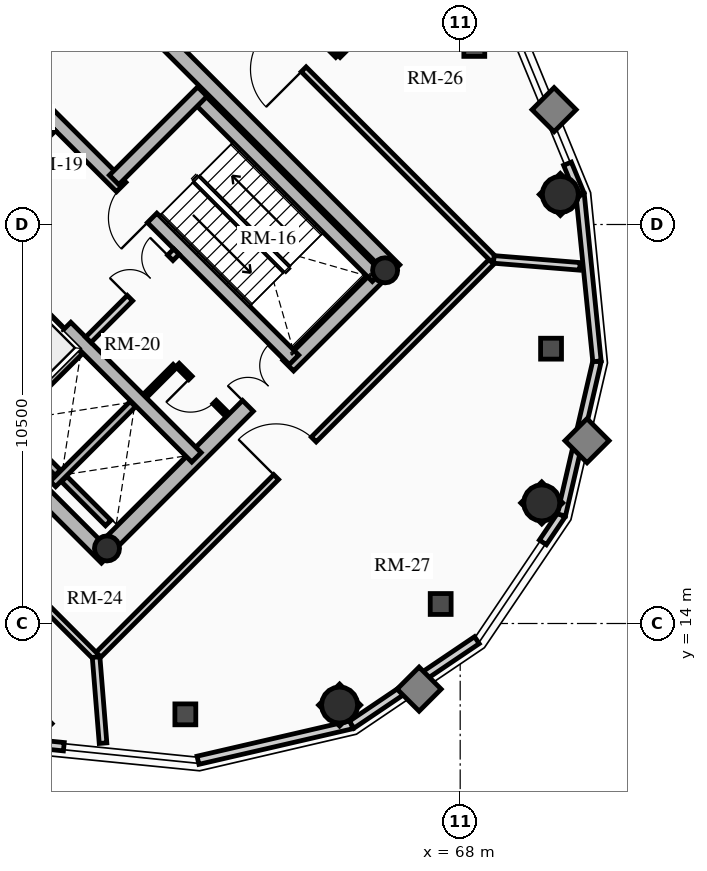
"""IFC4 building model, lengths in metres.
Left out: names, types, materials, properties, quantities, classifications, styles, units other than length and angle.
Written with IfcOpenShell. Run it as: python <this file> out.ifc"""

import sys

from ifc_helpers import new_model, si_unit, direction, frame, frame_2d, origin, origin_2d, place, context, subcontext, project, spatial, rectangle, circle, hollow_circle, extrude, source, transform, mapped, element, fill, save


model = new_model("IFC4")
c1 = context("Model", 3, precision=1e-05, world=origin(), true_north=direction((0.0, 1.0)))
c2 = subcontext(c1, "Body", "Model", "MODEL_VIEW")
j1 = project(units=[si_unit("LENGTHUNIT", "METRE"), si_unit("PLANEANGLEUNIT", "RADIAN")], contexts=[c1])
p1 = place(None, origin())
s1 = spatial("IfcSite", under=j1, at=p1, CompositionType="ELEMENT")
p2 = place(p1, origin())
s2 = spatial("IfcBuilding", under=s1, at=p2, CompositionType="ELEMENT")
p3 = place(p2, frame((0.0, 0.0, 235.65)))
s3 = spatial("IfcBuildingStorey", under=s2, at=p3, CompositionType="ELEMENT", Elevation=235.65)
for number, where, z_axis, x_axis in (
    (1, (58.702, 15.732, 0.0), (0.0, 0.0, 1.0), (-0.707, 0.707, 0.0)),
    (2, (66.268, 23.298, 0.0), (0.0, 0.0, 1.0), (-0.707, 0.707, 0.0)),
):
    element("IfcWall", number, at=place(p3, frame(where, z_axis=z_axis, x_axis=x_axis)), inside=s3, PredefinedType="SHEAR", context=c2, shape_type="SweptSolid", body=[
        extrude(rectangle(XDim=14.1, YDim=0.4, at=frame_2d((7.05, 0.0))), origin(), (0.0, 0.0, 1.0), 4.68),
    ])
p4 = place(p3, frame((58.561, 15.873, 0.0), z_axis=(0.0, 0.0, 1.0), x_axis=(0.707106781187, 0.707106781187, 0.0)))
e3 = element("IfcWall", 3, at=p4, inside=s3, PredefinedType="SHEAR", context=c2, shape_type="SweptSolid", body=[
    extrude(rectangle(XDim=10.7, YDim=0.4, at=frame_2d((5.35, 0.0))), origin(), (0.0, 0.0, 1.0), 4.68),
])
m1 = source(origin(), c2, "Body", "SweptSolid", [
    extrude(rectangle(XDim=1.5, YDim=2.02, at=frame_2d((0.75, 1.01))), frame((0.0, 0.21, 0.0), z_axis=(0.0, -1.0, 0.0), x_axis=(1.0, 0.0, 0.0)), (0.0, 0.0, 1.0), 0.42),
])
p5 = place(p4, frame((5.45, 0.0, 0.0)))
e4 = element("IfcOpeningElement", 4, at=p5, cuts=e3, PredefinedType="OPENING", context=c2, shape_type="MappedRepresentation", body=[
    mapped(m1, transform((0.0, 0.0, 0.0), x_axis=(1.0, 0.0, 0.0), y_axis=(0.0, 1.0, 0.0), z_axis=(0.0, 0.0, 1.0), scale=1.0)),
])
p6 = place(p3, frame((61.06, 18.373, 0.0), z_axis=(0.0, 0.0, 1.0), x_axis=(-0.707106781187, 0.707106781187, 0.0)))
e5 = element("IfcWall", 5, at=p6, inside=s3, PredefinedType="SHEAR", context=c2, shape_type="SweptSolid", body=[
    extrude(rectangle(XDim=13.7, YDim=0.35, at=frame_2d((6.85, 0.0))), origin(), (0.0, 0.0, 1.0), 4.68),
])
m2 = source(origin(), c2, "Body", "SweptSolid", [
    extrude(rectangle(XDim=1.1, YDim=2.015, at=frame_2d((0.55, 1.007))), frame((0.0, 0.185, 0.0), z_axis=(0.0, -1.0, 0.0), x_axis=(1.0, 0.0, 0.0)), (0.0, 0.0, 1.0), 0.37),
])
p7 = place(p6, frame((4.85, 0.0, 0.0)))
e6 = element("IfcOpeningElement", 6, at=p7, cuts=e5, PredefinedType="OPENING", context=c2, shape_type="MappedRepresentation", body=[
    mapped(m2, transform((0.0, 0.0, 0.0), x_axis=(1.0, 0.0, 0.0), y_axis=(0.0, 1.0, 0.0), z_axis=(0.0, 0.0, 1.0), scale=1.0)),
])
m3 = source(origin(), c2, "Body", "SweptSolid", [
    extrude(rectangle(XDim=1.15, YDim=2.02, at=frame_2d((0.575, 1.01))), frame((0.0, 0.185, 0.0), z_axis=(0.0, -1.0, 0.0), x_axis=(1.0, 0.0, 0.0)), (0.0, 0.0, 1.0), 0.37),
])
p8 = place(p6, frame((7.27, 0.0, 0.0)))
e7 = element("IfcOpeningElement", 7, at=p8, cuts=e5, PredefinedType="OPENING", context=c2, shape_type="MappedRepresentation", body=[
    mapped(m3, transform((0.0, 0.0, 0.0), x_axis=(1.0, 0.0, 0.0), y_axis=(0.0, 1.0, 0.0), z_axis=(0.0, 0.0, 1.0), scale=1.0)),
])
p9 = place(p3, frame((63.627, 20.94, 0.0), z_axis=(0.0, 0.0, 1.0), x_axis=(-0.707119496762, 0.707094065383, 0.0)))
e8 = element("IfcWall", 8, at=p9, inside=s3, PredefinedType="SHEAR", context=c2, shape_type="SweptSolid", body=[
    extrude(rectangle(XDim=9.6, YDim=0.35, at=frame_2d((4.8, 0.0))), origin(), (0.0, 0.0, 1.0), 4.68),
])
p10 = place(p9, frame((5.28, 0.0, 0.0)))
e9 = element("IfcOpeningElement", 9, at=p10, cuts=e8, PredefinedType="OPENING", context=c2, shape_type="MappedRepresentation", body=[
    mapped(m3, transform((0.0, 0.0, 0.0), x_axis=(1.0, 0.0, 0.0), y_axis=(0.0, 1.0, 0.0), z_axis=(0.0, 0.0, 1.0), scale=1.0)),
])
p11 = place(p3, frame((65.812, 23.125, 0.0), z_axis=(0.0, 0.0, 1.0), x_axis=(-0.707106781187, 0.707106781187, 0.0)))
e10 = element("IfcWall", 10, at=p11, inside=s3, PredefinedType="SHEAR", context=c2, shape_type="SweptSolid", body=[
    extrude(rectangle(XDim=6.695, YDim=0.35, at=frame_2d((3.348, 0.0))), origin(), (0.0, 0.0, 1.0), 4.68),
])
p12 = place(p3, frame((58.893, 25.674, 0.0), z_axis=(0.0, 0.0, 1.0), x_axis=(0.707106781187, 0.707106781187, 0.0)))
e11 = element("IfcWall", 11, at=p12, inside=s3, PredefinedType="SHEAR", context=c2, shape_type="SweptSolid", body=[
    extrude(rectangle(XDim=3.285, YDim=0.35, at=frame_2d((1.643, 0.0))), origin(), (0.0, 0.0, 1.0), 4.68),
])
for number, where, z_axis, x_axis in (
    (12, (58.706, 15.976, 0.0), (0.0, 0.0, 1.0), (0.707, 0.707, 0.0)),
    (13, (66.024, 23.294, 0.0), (0.0, 0.0, 1.0), (0.707, 0.707, 0.0)),
):
    element("IfcColumn", number, at=place(p3, frame(where, z_axis=z_axis, x_axis=x_axis)), inside=s3, PredefinedType="COLUMN", context=c2, shape_type="SweptSolid", body=[
        extrude(hollow_circle(Radius=0.33, WallThickness=0.025, at=origin_2d()), origin(), (0.0, 0.0, 1.0), 4.68),
    ])
for number, where, z_axis, x_axis in (
    (14, (64.827, 11.854, 0.0), (0.0, 0.0, 1.0), (1.0, 0.0, 0.0)),
    (15, (70.146, 17.173, 0.0), (0.0, 0.0, 1.0), (1.0, 0.0, 0.0)),
    (16, (70.635, 25.291, 0.0), (0.0, 0.0, 1.0), (1.0, 0.0, 0.0)),
):
    element("IfcColumn", number, at=place(p3, frame(where, z_axis=z_axis, x_axis=x_axis)), inside=s3, PredefinedType="COLUMN", context=c2, shape_type="SweptSolid", body=[
        extrude(circle(Radius=0.475, at=origin_2d()), origin(), (0.0, 0.0, 1.0), 4.68),
    ])
p13 = place(p3, frame((57.57, 10.758, 0.0), z_axis=(0.0, 0.0, 1.0), x_axis=(-0.994914209363, 0.100725945054, 0.0)))
e17 = element("IfcWall", 17, at=p13, inside=s3, PredefinedType="SOLIDWALL", context=c2, shape_type="SweptSolid", body=[
    extrude(rectangle(XDim=0.87, YDim=0.22, at=frame_2d((0.435, 0.0))), origin(), (0.0, 0.0, 1.0), 3.696),
])
p14 = place(p3, frame((65.144, 11.337, 0.0), z_axis=(0.0, 0.0, 1.0), x_axis=(-0.974249228678, -0.225473813158, 0.0)))
e18 = element("IfcWall", 18, at=p14, inside=s3, PredefinedType="SOLIDWALL", context=c2, shape_type="SweptSolid", body=[
    extrude(rectangle(XDim=4.15, YDim=0.22, at=frame_2d((2.075, 0.0))), origin(), (0.0, 0.0, 1.0), 3.696),
])
p15 = place(p3, frame((68.439, 13.561, 0.0), z_axis=(0.0, 0.0, 1.0), x_axis=(-0.828833723692, -0.559495003079, 0.0)))
e19 = element("IfcWall", 19, at=p15, inside=s3, PredefinedType="SOLIDWALL", context=c2, shape_type="SweptSolid", body=[
    extrude(rectangle(XDim=3.976, YDim=0.22, at=frame_2d((1.988, 0.0))), origin(), (0.0, 0.0, 1.0), 3.696),
])
p16 = place(p3, frame((70.663, 16.856, 0.0), z_axis=(0.0, 0.0, 1.0), x_axis=(-0.559482492851, -0.828842168446, 0.0)))
e20 = element("IfcWall", 20, at=p16, inside=s3, PredefinedType="SOLIDWALL", context=c2, shape_type="SweptSolid", body=[
    extrude(rectangle(XDim=0.87, YDim=0.22, at=frame_2d((0.435, 0.0))), origin(), (0.0, 0.0, 1.0), 3.696),
])
p17 = place(p3, frame((71.599, 20.9, 0.0), z_axis=(0.0, 0.0, 1.0), x_axis=(-0.225473813158, -0.974249228678, 0.0)))
e21 = element("IfcWall", 21, at=p17, inside=s3, PredefinedType="SOLIDWALL", context=c2, shape_type="SweptSolid", body=[
    extrude(rectangle(XDim=4.15, YDim=0.22, at=frame_2d((2.075, 0.0))), origin(), (0.0, 0.0, 1.0), 3.696),
])
p18 = place(p3, frame((71.155, 25.295, 0.0), z_axis=(0.0, 0.0, 1.0), x_axis=(0.100570534541, -0.994929930991, 0.0)))
e22 = element("IfcWall", 22, at=p18, inside=s3, PredefinedType="SOLIDWALL", context=c2, shape_type="SweptSolid", body=[
    extrude(rectangle(XDim=4.418, YDim=0.22, at=frame_2d((2.209, 0.0))), origin(), (0.0, 0.0, 1.0), 3.696),
])
p19 = place(p3, frame((70.823, 26.1, 0.0), z_axis=(0.0, 0.0, 1.0), x_axis=(0.381145028536, -0.924515260676, 0.0)))
e23 = element("IfcWall", 23, at=p19, inside=s3, PredefinedType="SOLIDWALL", context=c2, shape_type="SweptSolid", body=[
    extrude(rectangle(XDim=0.87, YDim=0.22, at=frame_2d((0.435, 0.0))), origin(), (0.0, 0.0, 1.0), 3.696),
])
p20 = place(p3, frame((55.888, 19.069, 0.0), z_axis=(0.0, 0.0, 1.0), x_axis=(0.707106781187, 0.707106781187, 0.0)))
e24 = element("IfcWall", 24, at=p20, inside=s3, PredefinedType="SHEAR", context=c2, shape_type="SweptSolid", body=[
    extrude(rectangle(XDim=2.97, YDim=0.2, at=frame_2d((1.485, 0.0))), origin(), (0.0, 0.0, 1.0), 4.68),
])
p21 = place(p3, frame((57.284, 17.673, 0.0), z_axis=(0.0, 0.0, 1.0), x_axis=(0.707147878904, 0.70706568108, 0.0)))
e25 = element("IfcWall", 25, at=p21, inside=s3, PredefinedType="SHEAR", context=c2, shape_type="SweptSolid", body=[
    extrude(rectangle(XDim=2.97, YDim=0.2, at=frame_2d((1.485, 0.0))), origin(), (0.0, 0.0, 1.0), 4.68),
])
p22 = place(p3, frame((57.412, 17.97, 0.0), z_axis=(0.0, 0.0, 1.0), x_axis=(-0.707106781187, 0.707106781187, 0.0)))
e26 = element("IfcWall", 26, at=p22, inside=s3, PredefinedType="SHEAR", context=c2, shape_type="SweptSolid", body=[
    extrude(rectangle(XDim=1.735, YDim=0.2, at=frame_2d((0.867, 0.0))), origin(), (0.0, 0.0, 1.0), 4.68),
])
p23 = place(p3, frame((58.737, 16.644, 0.0), z_axis=(0.0, 0.0, 1.0), x_axis=(-0.707032117043, 0.707181437447, 0.0)))
e27 = element("IfcWall", 27, at=p23, inside=s3, PredefinedType="SHEAR", context=c2, shape_type="SweptSolid", body=[
    extrude(rectangle(XDim=1.635, YDim=0.2, at=frame_2d((0.817, 0.0))), origin(), (0.0, 0.0, 1.0), 4.68),
])
p24 = place(p3, frame((58.214, 21.467, 0.0), z_axis=(0.0, 0.0, 1.0), x_axis=(0.707106781187, 0.707106781187, 0.0)))
e28 = element("IfcWall", 28, at=p24, inside=s3, PredefinedType="PARTITIONING", context=c2, shape_type="SweptSolid", body=[
    extrude(rectangle(XDim=3.28, YDim=0.2, at=frame_2d((1.64, 0.0))), origin(), (0.0, 0.0, 1.0), 4.325),
])
m4 = source(origin(), c2, "Body", "SweptSolid", [
    extrude(rectangle(XDim=1.5, YDim=2.02, at=frame_2d((0.75, 1.01))), frame((0.0, 0.11, 0.0), z_axis=(0.0, -1.0, 0.0), x_axis=(1.0, 0.0, 0.0)), (0.0, 0.0, 1.0), 0.22),
])
p25 = place(p24, frame((1.55, 0.0, 0.0)))
e29 = element("IfcOpeningElement", 29, at=p25, cuts=e28, PredefinedType="OPENING", context=c2, shape_type="MappedRepresentation", body=[
    mapped(m4, transform((0.0, 0.0, 0.0), x_axis=(1.0, 0.0, 0.0), y_axis=(0.0, 1.0, 0.0), z_axis=(0.0, 0.0, 1.0), scale=1.0)),
])
p26 = place(p3, frame((54.961, 24.719, 0.0), z_axis=(0.0, 0.0, 1.0), x_axis=(0.707106781187, 0.707106781187, 0.0)))
e30 = element("IfcWall", 30, at=p26, inside=s3, PredefinedType="PARTITIONING", context=c2, shape_type="SweptSolid", body=[
    extrude(rectangle(XDim=3.28, YDim=0.2, at=frame_2d((1.64, 0.0))), origin(), (0.0, 0.0, 1.0), 4.325),
])
m5 = source(origin(), c2, "Body", "SweptSolid", [
    extrude(rectangle(XDim=0.9, YDim=2.005, at=frame_2d((0.45, 1.002))), frame((0.0, 0.11, 0.0), z_axis=(0.0, -1.0, 0.0), x_axis=(1.0, 0.0, 0.0)), (0.0, 0.0, 1.0), 0.22),
])
p27 = place(p26, frame((0.16, 0.0, 0.0)))
e31 = element("IfcOpeningElement", 31, at=p27, cuts=e30, PredefinedType="OPENING", context=c2, shape_type="MappedRepresentation", body=[
    mapped(m5, transform((0.0, 0.0, 0.0), x_axis=(1.0, 0.0, 0.0), y_axis=(0.0, 1.0, 0.0), z_axis=(0.0, 0.0, 1.0), scale=1.0)),
])
p28 = place(p3, frame((61.835, 19.529, 0.0), z_axis=(0.0, 0.0, 1.0), x_axis=(-0.707174592913, 0.707038962956, 0.0)))
e32 = element("IfcWall", 32, at=p28, inside=s3, PredefinedType="PARTITIONING", context=c2, shape_type="SweptSolid", body=[
    extrude(rectangle(XDim=1.8, YDim=0.125, at=frame_2d((0.9, 0.0))), origin(), (0.0, 0.0, 1.0), 4.325),
])
m6 = source(origin(), c2, "Body", "SweptSolid", [
    extrude(rectangle(XDim=0.9, YDim=2.005, at=frame_2d((0.45, 1.002))), frame((0.0, 0.073, 0.0), z_axis=(0.0, -1.0, 0.0), x_axis=(1.0, 0.0, 0.0)), (0.0, 0.0, 1.0), 0.145),
])
p29 = place(p28, frame((0.42, 0.0, 0.0)))
e33 = element("IfcOpeningElement", 33, at=p29, cuts=e32, PredefinedType="OPENING", context=c2, shape_type="MappedRepresentation", body=[
    mapped(m6, transform((0.0, 0.0, 0.0), x_axis=(1.0, 0.0, 0.0), y_axis=(0.0, 1.0, 0.0), z_axis=(0.0, 0.0, 1.0), scale=1.0)),
])
p30 = place(p3, frame((59.713, 19.996, 0.0), z_axis=(0.0, 0.0, 1.0), x_axis=(0.707217726, 0.706995818963, 0.0)))
e34 = element("IfcWall", 34, at=p30, inside=s3, PredefinedType="PARTITIONING", context=c2, shape_type="SweptSolid", body=[
    extrude(rectangle(XDim=1.1, YDim=0.125, at=frame_2d((0.55, 0.0))), origin(), (0.0, 0.0, 1.0), 4.325),
])
p31 = place(p3, frame((58.419, 13.115, 0.0), z_axis=(0.0, 0.0, 1.0), x_axis=(0.707106781187, 0.707106781187, 0.0)))
e35 = element("IfcWall", 35, at=p31, inside=s3, PredefinedType="PARTITIONING", context=c2, shape_type="SweptSolid", body=[
    extrude(rectangle(XDim=14.8, YDim=0.18, at=frame_2d((7.4, 0.0))), origin(), (0.0, 0.0, 1.0), 3.616),
])
m7 = source(origin(), c2, "Body", "SweptSolid", [
    extrude(rectangle(XDim=1.4, YDim=2.02, at=frame_2d((0.7, 1.01))), frame((0.0, 0.1, 0.0), z_axis=(0.0, -1.0, 0.0), x_axis=(1.0, 0.0, 0.0)), (0.0, 0.0, 1.0), 0.2),
])
p32 = place(p31, frame((6.7, 0.0, 0.0)))
e36 = element("IfcOpeningElement", 36, at=p32, cuts=e35, PredefinedType="OPENING", context=c2, shape_type="MappedRepresentation", body=[
    mapped(m7, transform((0.0, 0.0, 0.0), x_axis=(1.0, 0.0, 0.0), y_axis=(0.0, 1.0, 0.0), z_axis=(0.0, 0.0, 1.0), scale=1.0)),
])
p33 = place(p3, frame((58.419, 13.115, 0.0), z_axis=(0.0, 0.0, 1.0), x_axis=(-0.707106781187, 0.707106781187, 0.0)))
e37 = element("IfcWall", 37, at=p33, inside=s3, PredefinedType="PARTITIONING", context=c2, shape_type="SweptSolid", body=[
    extrude(rectangle(XDim=15.55, YDim=0.18, at=frame_2d((7.775, 0.0))), origin(), (0.0, 0.0, 1.0), 3.616),
])
p34 = place(p33, frame((7.075, 0.0, 0.0)))
e38 = element("IfcOpeningElement", 38, at=p34, cuts=e37, PredefinedType="OPENING", context=c2, shape_type="MappedRepresentation", body=[
    mapped(m7, transform((0.0, 0.0, 0.0), x_axis=(1.0, 0.0, 0.0), y_axis=(0.0, 1.0, 0.0), z_axis=(0.0, 0.0, 1.0), scale=1.0)),
])
p35 = place(p3, frame((68.885, 23.581, 0.0), z_axis=(0.0, 0.0, 1.0), x_axis=(-0.707106781187, 0.707106781187, 0.0)))
e39 = element("IfcWall", 39, at=p35, inside=s3, PredefinedType="PARTITIONING", context=c2, shape_type="SweptSolid", body=[
    extrude(rectangle(XDim=15.55, YDim=0.18, at=frame_2d((7.775, 0.0))), origin(), (0.0, 0.0, 1.0), 2.892),
])
p36 = place(p35, frame((7.075, 0.0, 0.0)))
e40 = element("IfcOpeningElement", 40, at=p36, cuts=e39, PredefinedType="OPENING", context=c2, shape_type="MappedRepresentation", body=[
    mapped(m7, transform((0.0, 0.0, 0.0), x_axis=(1.0, 0.0, 0.0), y_axis=(0.0, 1.0, 0.0), z_axis=(0.0, 0.0, 1.0), scale=1.0)),
])
for number, where, z_axis, x_axis in (
    (41, (68.885, 23.581, 0.0), (0.0, 0.0, 1.0), (0.997, -0.081, 0.0)),
    (42, (58.419, 13.115, 0.0), (0.0, 0.0, 1.0), (0.081, -0.997, 0.0)),
):
    element("IfcWall", number, at=place(p3, frame(where, z_axis=z_axis, x_axis=x_axis)), inside=s3, PredefinedType="PARTITIONING", context=c2, shape_type="SweptSolid", body=[
        extrude(rectangle(XDim=2.271, YDim=0.2, at=frame_2d((1.136, 0.0))), origin(), (0.0, 0.0, 1.0), 3.696),
    ])
p37 = place(p3, frame((64.783, 28.955, 0.0), z_axis=(0.0, 0.0, 1.0), x_axis=(-0.707106781187, 0.707106781187, 0.0)))
e43 = element("IfcWall", 43, at=p37, inside=s3, PredefinedType="PARTITIONING", context=c2, shape_type="SweptSolid", body=[
    extrude(rectangle(XDim=4.0, YDim=0.16, at=frame_2d((2.0, 0.0))), origin(), (0.0, 0.0, 1.0), 4.325),
])
p38 = place(p3, frame((64.783, 28.955, 0.0), z_axis=(0.0, 0.0, 1.0), x_axis=(0.707142683133, 0.707070877417, 0.0)))
e44 = element("IfcWall", 44, at=p38, inside=s3, PredefinedType="PARTITIONING", context=c2, shape_type="SweptSolid", body=[
    extrude(rectangle(XDim=3.4, YDim=0.16, at=frame_2d((1.7, 0.0))), origin(), (0.0, 0.0, 1.0), 3.696),
])
m8 = source(origin(), c2, "Body", "SweptSolid", [
    extrude(rectangle(XDim=1.1, YDim=2.015, at=frame_2d((0.55, 1.007))), frame((0.0, 0.025, 0.0), z_axis=(0.0, -1.0, 0.0), x_axis=(1.0, 0.0, 0.0)), (0.0, 0.0, 1.0), 0.05),
])
p39 = place(p7, origin())
e45 = element("IfcDoor", 45, at=p39, inside=s3, OperationType="SLIDING_TO_LEFT", PredefinedType="DOOR", context=c2, shape_type="MappedRepresentation", body=[
    mapped(m8, transform((0.0, 0.0, 0.0), x_axis=(1.0, 0.0, 0.0), y_axis=(0.0, 1.0, 0.0), z_axis=(0.0, 0.0, 1.0), scale=1.0)),
])
fill(e6, e45)
m9 = source(origin(), c2, "Body", "SweptSolid", [
    extrude(rectangle(XDim=1.15, YDim=2.02, at=frame_2d((0.575, 1.01))), frame((0.0, 0.025, 0.0), z_axis=(0.0, -1.0, 0.0), x_axis=(1.0, 0.0, 0.0)), (0.0, 0.0, 1.0), 0.05),
])
p40 = place(p10, origin())
e46 = element("IfcDoor", 46, at=p40, inside=s3, OperationType="SINGLE_SWING_LEFT", PredefinedType="DOOR", context=c2, shape_type="MappedRepresentation", body=[
    mapped(m9, transform((0.0, 0.0, 0.0), x_axis=(1.0, 0.0, 0.0), y_axis=(0.0, 1.0, 0.0), z_axis=(0.0, 0.0, 1.0), scale=1.0)),
])
fill(e9, e46)
m10 = source(origin(), c2, "Body", "SweptSolid", [
    extrude(rectangle(XDim=1.5, YDim=2.02, at=frame_2d((0.75, 1.01))), frame((0.0, 0.025, 0.0), z_axis=(0.0, -1.0, 0.0), x_axis=(1.0, 0.0, 0.0)), (0.0, 0.0, 1.0), 0.05),
])
p41 = place(p5, origin())
e47 = element("IfcDoor", 47, at=p41, inside=s3, OperationType="DOUBLE_DOOR_SINGLE_SWING", PredefinedType="DOOR", context=c2, shape_type="MappedRepresentation", body=[
    mapped(m10, transform((0.0, 0.0, 0.0), x_axis=(1.0, 0.0, 0.0), y_axis=(0.0, 1.0, 0.0), z_axis=(0.0, 0.0, 1.0), scale=1.0)),
])
fill(e4, e47)
p42 = place(p25, origin())
e48 = element("IfcDoor", 48, at=p42, inside=s3, OperationType="DOUBLE_DOOR_SINGLE_SWING", PredefinedType="DOOR", context=c2, shape_type="MappedRepresentation", body=[
    mapped(m10, transform((0.0, 0.0, 0.0), x_axis=(1.0, 0.0, 0.0), y_axis=(0.0, 1.0, 0.0), z_axis=(0.0, 0.0, 1.0), scale=1.0)),
])
fill(e29, e48)
m11 = source(origin(), c2, "Body", "SweptSolid", [
    extrude(rectangle(XDim=0.9, YDim=2.005, at=frame_2d((0.45, 1.002))), frame((0.0, 0.025, 0.0), z_axis=(0.0, -1.0, 0.0), x_axis=(1.0, 0.0, 0.0)), (0.0, 0.0, 1.0), 0.05),
])
p43 = place(p29, origin())
e49 = element("IfcDoor", 49, at=p43, inside=s3, OperationType="SINGLE_SWING_RIGHT", PredefinedType="DOOR", context=c2, shape_type="MappedRepresentation", body=[
    mapped(m11, transform((0.0, 0.0, 0.0), x_axis=(1.0, 0.0, 0.0), y_axis=(0.0, 1.0, 0.0), z_axis=(0.0, 0.0, 1.0), scale=1.0)),
])
fill(e33, e49)
m12 = source(origin(), c2, "Body", "SweptSolid", [
    extrude(rectangle(XDim=1.4, YDim=2.02, at=frame_2d((0.7, 1.01))), frame((0.0, 0.025, 0.0), z_axis=(0.0, -1.0, 0.0), x_axis=(1.0, 0.0, 0.0)), (0.0, 0.0, 1.0), 0.05),
])
p44 = place(p32, origin())
e50 = element("IfcDoor", 50, at=p44, inside=s3, OperationType="SINGLE_SWING_LEFT", PredefinedType="DOOR", context=c2, shape_type="MappedRepresentation", body=[
    mapped(m12, transform((0.0, 0.0, 0.0), x_axis=(1.0, 0.0, 0.0), y_axis=(0.0, 1.0, 0.0), z_axis=(0.0, 0.0, 1.0), scale=1.0)),
])
fill(e36, e50)
p45 = place(p36, origin())
e51 = element("IfcDoor", 51, at=p45, inside=s3, OperationType="SINGLE_SWING_LEFT", PredefinedType="DOOR", context=c2, shape_type="MappedRepresentation", body=[
    mapped(m12, transform((0.0, 0.0, 0.0), x_axis=(1.0, 0.0, 0.0), y_axis=(0.0, 1.0, 0.0), z_axis=(0.0, 0.0, 1.0), scale=1.0)),
])
fill(e40, e51)
save(model, sys.argv[1])
